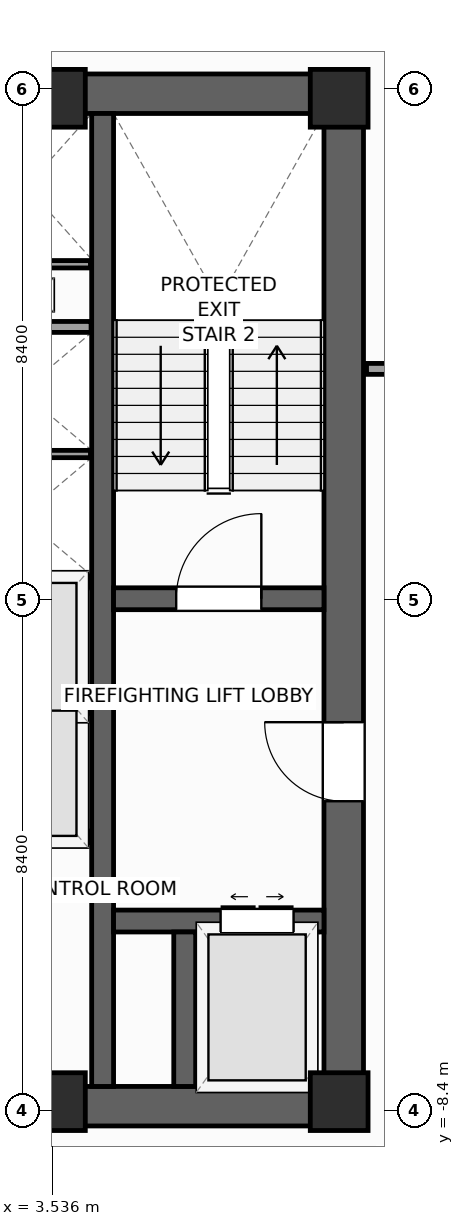
"""IFC4 building model, lengths in metres.
Left out: names, types, materials, properties, quantities, classifications, styles, units other than length and angle.
Written with IfcOpenShell. Run it as: python <this file> out.ifc"""

import sys

from ifc_helpers import new_model, si_unit, direction, frame, frame_2d, origin, origin_2d, place, context, subcontext, project, spatial, rectangle, extrude, source, transform, mapped, element, fill, save


model = new_model("IFC4")
c1 = context("Model", 3, precision=1e-05, world=origin(), true_north=direction((0.0, 1.0)))
c2 = subcontext(c1, "Body", "Model", "MODEL_VIEW")
j1 = project(units=[si_unit("LENGTHUNIT", "METRE"), si_unit("PLANEANGLEUNIT", "RADIAN")], contexts=[c1])
p1 = place(None, origin())
s1 = spatial("IfcSite", under=j1, at=p1, CompositionType="ELEMENT")
p2 = place(p1, origin())
s2 = spatial("IfcBuilding", under=s1, at=p2, CompositionType="ELEMENT")
p3 = place(p2, frame((0.0, 0.0, 196.4)))
s3 = spatial("IfcBuildingStorey", under=s2, at=p3, CompositionType="ELEMENT", Elevation=196.4)
p4 = place(p3, frame((-8.65, -8.325, 0.0), z_axis=(0.0, 0.0, 1.0), x_axis=(1.0, 0.0, 0.0)))
e1 = element("IfcWall", 1, at=p4, inside=s3, PredefinedType="SHEAR", context=c2, shape_type="SweptSolid", body=[
    extrude(rectangle(XDim=17.3, YDim=0.65, at=frame_2d((8.65, 0.0))), origin(), (0.0, 0.0, 1.0), 4.0),
])
p5 = place(p4, frame((8.0, 0.0, 0.0)))
e2 = element("IfcOpeningElement", 2, at=p5, cuts=e1, PredefinedType="OPENING", context=c2, shape_type="SweptSolid", body=[
    extrude(rectangle(XDim=1.3, YDim=2.2, at=frame_2d((0.65, 1.1))), frame((0.0, 0.335, 0.0), z_axis=(0.0, -1.0, 0.0), x_axis=(1.0, 0.0, 0.0)), (0.0, 0.0, 1.0), 0.67),
])
p6 = place(p3, frame((-8.65, 8.325, 0.0), z_axis=(0.0, 0.0, 1.0), x_axis=(1.0, 0.0, 0.0)))
e3 = element("IfcWall", 3, at=p6, inside=s3, PredefinedType="SHEAR", context=c2, shape_type="SweptSolid", body=[
    extrude(rectangle(XDim=17.3, YDim=0.65, at=frame_2d((8.65, 0.0))), origin(), (0.0, 0.0, 1.0), 4.0),
])
p7 = place(p3, frame((8.325, -8.0, 0.0), z_axis=(0.0, 0.0, 1.0), x_axis=(0.0, 1.0, 0.0)))
e4 = element("IfcWall", 4, at=p7, inside=s3, PredefinedType="SHEAR", context=c2, shape_type="SweptSolid", body=[
    extrude(rectangle(XDim=16.0, YDim=0.65, at=frame_2d((8.0, 0.0))), origin(), (0.0, 0.0, 1.0), 4.0),
])
p8 = place(p7, frame((4.69, 0.0, 0.0)))
e5 = element("IfcOpeningElement", 5, at=p8, cuts=e4, PredefinedType="OPENING", context=c2, shape_type="SweptSolid", body=[
    extrude(rectangle(XDim=1.3, YDim=2.2, at=frame_2d((0.65, 1.1))), frame((0.0, 0.335, 0.0), z_axis=(0.0, -1.0, 0.0), x_axis=(1.0, 0.0, 0.0)), (0.0, 0.0, 1.0), 0.67),
])
p9 = place(p3, frame((4.36, -8.0, 0.0), z_axis=(0.0, 0.0, 1.0), x_axis=(0.0, 1.0, 0.0)))
e6 = element("IfcWall", 6, at=p9, inside=s3, PredefinedType="SHEAR", context=c2, shape_type="SweptSolid", body=[
    extrude(rectangle(XDim=16.0, YDim=0.36, at=frame_2d((8.0, 0.0))), origin(), (0.0, 0.0, 1.0), 4.0),
])
p10 = place(p3, frame((4.54, 0.02, 0.0), z_axis=(0.0, 0.0, 1.0), x_axis=(1.0, 0.0, 0.0)))
e7 = element("IfcWall", 7, at=p10, inside=s3, PredefinedType="SHEAR", context=c2, shape_type="SweptSolid", body=[
    extrude(rectangle(XDim=3.46, YDim=0.36, at=frame_2d((1.73, 0.0))), origin(), (0.0, 0.0, 1.0), 4.0),
])
p11 = place(p10, frame((1.03, 0.0, 0.0)))
e8 = element("IfcOpeningElement", 8, at=p11, cuts=e7, PredefinedType="OPENING", context=c2, shape_type="SweptSolid", body=[
    extrude(rectangle(XDim=1.4, YDim=2.2, at=frame_2d((0.7, 1.1))), frame((0.0, 0.19, 0.0), z_axis=(0.0, -1.0, 0.0), x_axis=(1.0, 0.0, 0.0)), (0.0, 0.0, 1.0), 0.38),
])
p12 = place(p3, frame((4.54, -5.28, 0.0), z_axis=(0.0, 0.0, 1.0), x_axis=(1.0, 0.0, 0.0)))
e9 = element("IfcWall", 9, at=p12, inside=s3, PredefinedType="SHEAR", context=c2, shape_type="SweptSolid", body=[
    extrude(rectangle(XDim=3.46, YDim=0.36, at=frame_2d((1.73, 0.0))), origin(), (0.0, 0.0, 1.0), 4.0),
])
p13 = place(p12, frame((1.76, 0.0, 0.0)))
e10 = element("IfcOpeningElement", 10, at=p13, cuts=e9, PredefinedType="OPENING", context=c2, shape_type="SweptSolid", body=[
    extrude(rectangle(XDim=1.2, YDim=2.25, at=frame_2d((0.6, 1.125))), frame((0.0, 0.19, 0.0), z_axis=(0.0, -1.0, 0.0), x_axis=(1.0, 0.0, 0.0)), (0.0, 0.0, 1.0), 0.38),
])
p14 = place(p3, frame((5.71, -8.0, 0.0), z_axis=(0.0, 0.0, 1.0), x_axis=(0.0, 1.0, 0.0)))
e11 = element("IfcWall", 11, at=p14, inside=s3, PredefinedType="SHEAR", context=c2, shape_type="SweptSolid", body=[
    extrude(rectangle(XDim=2.54, YDim=0.36, at=frame_2d((1.27, 0.0))), origin(), (0.0, 0.0, 1.0), 4.0),
])
m1 = source(origin(), c2, "Body", "SweptSolid", [
    extrude(rectangle(XDim=0.95, YDim=0.95, at=origin_2d()), origin(), (0.0, 0.0, 1.0), 4.0),
])
for number, where, z_axis, x_axis in (
    (12, (8.25, -8.25, 0.0), (0.0, 0.0, 1.0), (1.0, 0.0, 0.0)),
    (13, (8.25, 8.25, 0.0), (0.0, 0.0, 1.0), (1.0, 0.0, 0.0)),
    (14, (3.6, -8.25, 0.0), (0.0, 0.0, 1.0), (1.0, 0.0, 0.0)),
    (15, (3.6, 8.25, 0.0), (0.0, 0.0, 1.0), (1.0, 0.0, 0.0)),
):
    element("IfcColumn", number, at=place(p3, frame(where, z_axis=z_axis, x_axis=x_axis)), inside=s3, PredefinedType="PILASTER", context=c2, shape_type="MappedRepresentation", body=[
        mapped(m1, transform((0.0, 0.0, 0.0), scale=1.0)),
    ])
for number, where, z_axis, x_axis in (
    (16, (1.89, -3.9, 0.0), (0.0, 0.0, 1.0), (1.0, 0.0, 0.0)),
    (17, (1.89, 0.3, 0.0), (0.0, 0.0, 1.0), (1.0, 0.0, 0.0)),
    (18, (1.89, 4.49, 0.0), (0.0, 0.0, 1.0), (1.0, 0.0, 0.0)),
):
    element("IfcWall", number, at=place(p3, frame(where, z_axis=z_axis, x_axis=x_axis)), inside=s3, PredefinedType="PARTITIONING", context=c2, shape_type="SweptSolid", body=[
        extrude(rectangle(XDim=2.28, YDim=0.18, at=frame_2d((1.14, 0.0))), origin(), (0.0, 0.0, 1.0), 3.6),
    ])
for number, where, z_axis, x_axis in (
    (19, (1.9, -1.8, 0.0), (0.0, 0.0, 1.0), (1.0, 0.0, 0.0)),
    (20, (1.9, 2.4, 0.0), (0.0, 0.0, 1.0), (1.0, 0.0, 0.0)),
):
    element("IfcWall", number, at=place(p3, frame(where, z_axis=z_axis, x_axis=x_axis)), inside=s3, PredefinedType="PARTITIONING", context=c2, shape_type="SweptSolid", body=[
        extrude(rectangle(XDim=2.26, YDim=0.12, at=frame_2d((1.13, 0.0))), origin(), (0.0, 0.0, 1.0), 3.6),
    ])
p15 = place(p3, frame((2.06, 5.52, 0.0), z_axis=(0.0, 0.0, 1.0), x_axis=(1.0, 0.0, 0.0)))
e21 = element("IfcWall", 21, at=p15, inside=s3, PredefinedType="PARTITIONING", context=c2, shape_type="SweptSolid", body=[
    extrude(rectangle(XDim=2.1, YDim=0.12, at=frame_2d((1.05, 0.0))), origin(), (0.0, 0.0, 1.0), 3.6),
])
p16 = place(p3, frame((8.7, 3.8, 0.0), z_axis=(0.0, 0.0, 1.0), x_axis=(1.0, 0.0, 0.0)))
e22 = element("IfcWall", 22, at=p16, inside=s3, PredefinedType="PARTITIONING", context=c2, shape_type="SweptSolid", body=[
    extrude(rectangle(XDim=3.9, YDim=0.18, at=frame_2d((1.95, 0.0))), origin(), (0.0, 0.0, 1.0), 3.6),
])
p17 = place(p16, frame((1.4, 0.0, 0.0)))
e23 = element("IfcOpeningElement", 23, at=p17, cuts=e22, PredefinedType="OPENING", context=c2, shape_type="SweptSolid", body=[
    extrude(rectangle(XDim=1.1, YDim=2.2, at=frame_2d((0.55, 1.1))), frame((0.0, 0.1, 0.0), z_axis=(0.0, -1.0, 0.0), x_axis=(1.0, 0.0, 0.0)), (0.0, 0.0, 1.0), 0.2),
])
m2 = source(origin(), c2, "Body", "SweptSolid", [
    extrude(rectangle(XDim=1.4, YDim=2.2, at=frame_2d((0.7, 1.1))), frame((0.0, 0.025, 0.0), z_axis=(0.0, -1.0, 0.0), x_axis=(1.0, 0.0, 0.0)), (0.0, 0.0, 1.0), 0.05),
])
p18 = place(p11, origin())
e24 = element("IfcDoor", 24, at=p18, inside=s3, OperationType="SINGLE_SWING_RIGHT", PredefinedType="DOOR", context=c2, shape_type="MappedRepresentation", body=[
    mapped(m2, transform((0.0, 0.0, 0.0), scale=1.0)),
])
fill(e8, e24)
m3 = source(origin(), c2, "Body", "SweptSolid", [
    extrude(rectangle(XDim=1.3, YDim=2.2, at=frame_2d((0.65, 1.1))), frame((0.0, 0.025, 0.0), z_axis=(0.0, -1.0, 0.0), x_axis=(1.0, 0.0, 0.0)), (0.0, 0.0, 1.0), 0.05),
])
p19 = place(p8, origin())
e25 = element("IfcDoor", 25, at=p19, inside=s3, OperationType="SINGLE_SWING_RIGHT", PredefinedType="DOOR", context=c2, shape_type="MappedRepresentation", body=[
    mapped(m3, transform((0.0, 0.0, 0.0), scale=1.0)),
])
fill(e5, e25)
m4 = source(origin(), c2, "Body", "SweptSolid", [
    extrude(rectangle(XDim=1.2, YDim=2.25, at=frame_2d((0.6, 1.125))), frame((0.0, 0.025, 0.0), z_axis=(0.0, -1.0, 0.0), x_axis=(1.0, 0.0, 0.0)), (0.0, 0.0, 1.0), 0.05),
])
p20 = place(p13, origin())
e26 = element("IfcDoor", 26, at=p20, inside=s3, OperationType="DOUBLE_DOOR_SLIDING", PredefinedType="DOOR", context=c2, shape_type="MappedRepresentation", body=[
    mapped(m4, transform((0.0, 0.0, 0.0), scale=1.0)),
])
fill(e10, e26)
save(model, sys.argv[1])
